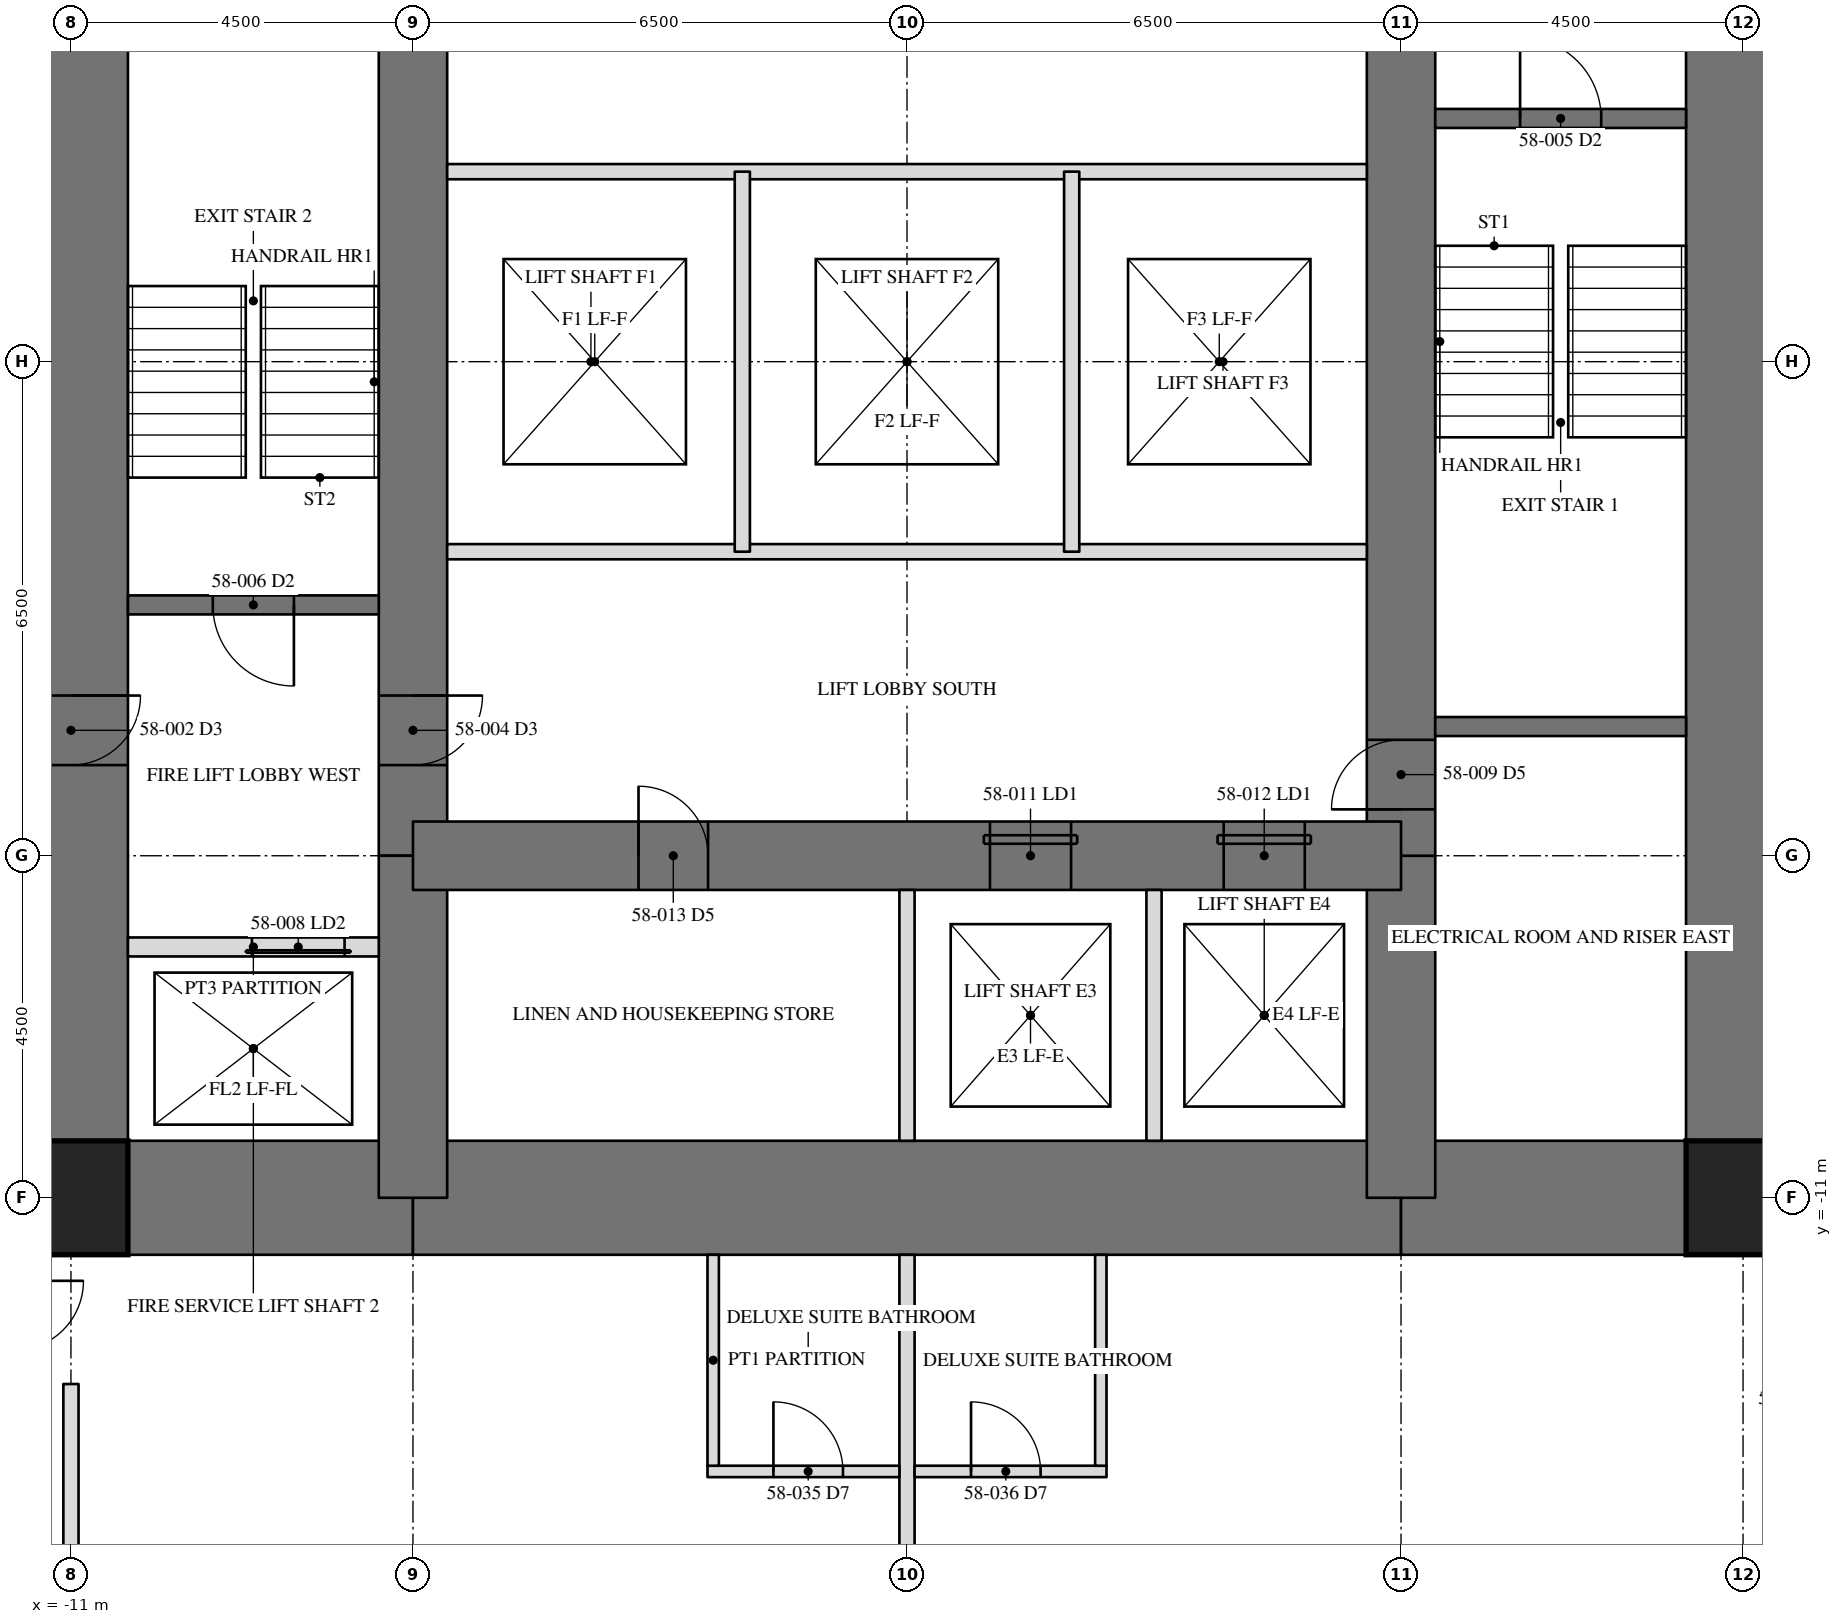
"""IFC4 building model, lengths in metres.
Left out: names, types, materials, properties, quantities, classifications, styles, units other than length and angle.
Written with IfcOpenShell. Run it as: python <this file> out.ifc"""

import sys

from ifc_helpers import new_model, si_unit, direction, frame, frame_2d, origin, origin_2d, place, context, subcontext, project, spatial, rectangle, hollow_rectangle, extrude, element, fill, save


model = new_model("IFC4")
c1 = context("Model", 3, precision=1e-05, world=origin(), true_north=direction((0.0, 1.0)))
c2 = subcontext(c1, "Body", "Model", "MODEL_VIEW")
j1 = project(units=[si_unit("LENGTHUNIT", "METRE"), si_unit("PLANEANGLEUNIT", "RADIAN")], contexts=[c1])
p1 = place(None, origin())
s1 = spatial("IfcSite", under=j1, at=p1, CompositionType="ELEMENT")
p2 = place(p1, origin())
s2 = spatial("IfcBuilding", under=s1, at=p2, CompositionType="ELEMENT")
p3 = place(p2, frame((0.0, 0.0, 239.7)))
s3 = spatial("IfcBuildingStorey", under=s2, at=p3, CompositionType="ELEMENT", Elevation=239.7)
p4 = place(p3, frame((11.0, -11.0, 0.0), z_axis=(0.0, 0.0, 1.0), x_axis=(0.0, 1.0, 0.0)))
e1 = element("IfcWall", 1, at=p4, inside=s3, PredefinedType="SHEAR", context=c2, shape_type="SweptSolid", body=[
    extrude(rectangle(XDim=22.0, YDim=1.5, at=frame_2d((11.0, 0.0))), origin(), (0.0, 0.0, 1.0), 3.5),
])
p5 = place(p4, frame((15.393, 0.0, 0.0)))
e2 = element("IfcOpeningElement", 2, at=p5, cuts=e1, PredefinedType="OPENING", context=c2, shape_type="SweptSolid", body=[
    extrude(rectangle(XDim=0.915, YDim=2.134, at=frame_2d((0.458, 1.067))), frame((0.0, 0.76, 0.0), z_axis=(0.0, -1.0, 0.0), x_axis=(1.0, 0.0, 0.0)), (0.0, 0.0, 1.0), 1.52),
])
p6 = place(p3, frame((-11.0, 11.0, 0.0), z_axis=(0.0, 0.0, 1.0), x_axis=(0.0, -1.0, 0.0)))
e3 = element("IfcWall", 3, at=p6, inside=s3, PredefinedType="SHEAR", context=c2, shape_type="SweptSolid", body=[
    extrude(rectangle(XDim=22.0, YDim=1.5, at=frame_2d((11.0, 0.0))), origin(), (0.0, 0.0, 1.0), 3.5),
])
p7 = place(p6, frame((15.393, 0.0, 0.0)))
e4 = element("IfcOpeningElement", 4, at=p7, cuts=e3, PredefinedType="OPENING", context=c2, shape_type="SweptSolid", body=[
    extrude(rectangle(XDim=0.915, YDim=2.134, at=frame_2d((0.458, 1.067))), frame((0.0, 0.76, 0.0), z_axis=(0.0, -1.0, 0.0), x_axis=(1.0, 0.0, 0.0)), (0.0, 0.0, 1.0), 1.52),
])
p8 = place(p3, frame((-11.0, -11.0, 0.0), z_axis=(0.0, 0.0, 1.0), x_axis=(1.0, 0.0, 0.0)))
e5 = element("IfcWall", 5, at=p8, inside=s3, PredefinedType="SHEAR", context=c2, shape_type="SweptSolid", body=[
    extrude(rectangle(XDim=4.5, YDim=1.5, at=frame_2d((2.25, 0.0))), origin(), (0.0, 0.0, 1.0), 3.5),
])
p9 = place(p3, frame((-6.5, -11.0, 0.0), z_axis=(0.0, 0.0, 1.0), x_axis=(1.0, 0.0, 0.0)))
e6 = element("IfcWall", 6, at=p9, inside=s3, PredefinedType="SHEAR", context=c2, shape_type="SweptSolid", body=[
    extrude(rectangle(XDim=13.0, YDim=1.5, at=frame_2d((6.5, 0.0))), origin(), (0.0, 0.0, 1.0), 3.5),
])
p10 = place(p3, frame((6.5, -11.0, 0.0), z_axis=(0.0, 0.0, 1.0), x_axis=(1.0, 0.0, 0.0)))
e7 = element("IfcWall", 7, at=p10, inside=s3, PredefinedType="SHEAR", context=c2, shape_type="SweptSolid", body=[
    extrude(rectangle(XDim=4.5, YDim=1.5, at=frame_2d((2.25, 0.0))), origin(), (0.0, 0.0, 1.0), 3.5),
])
p11 = place(p3, frame((6.5, -11.0, 0.0), z_axis=(0.0, 0.0, 1.0), x_axis=(0.0, 1.0, 0.0)))
e8 = element("IfcWall", 8, at=p11, inside=s3, PredefinedType="SHEAR", context=c2, shape_type="SweptSolid", body=[
    extrude(rectangle(XDim=4.5, YDim=0.9, at=frame_2d((2.25, 0.0))), origin(), (0.0, 0.0, 1.0), 3.5),
])
p12 = place(p3, frame((6.5, -6.5, 0.0), z_axis=(0.0, 0.0, 1.0), x_axis=(0.0, 1.0, 0.0)))
e9 = element("IfcWall", 9, at=p12, inside=s3, PredefinedType="SHEAR", context=c2, shape_type="SweptSolid", body=[
    extrude(rectangle(XDim=13.0, YDim=0.9, at=frame_2d((6.5, 0.0))), origin(), (0.0, 0.0, 1.0), 3.5),
])
p13 = place(p12, frame((10.893, 0.0, 0.0)))
e10 = element("IfcOpeningElement", 10, at=p13, cuts=e9, PredefinedType="OPENING", context=c2, shape_type="SweptSolid", body=[
    extrude(rectangle(XDim=0.915, YDim=2.134, at=frame_2d((0.458, 1.067))), frame((0.0, 0.46, 0.0), z_axis=(0.0, -1.0, 0.0), x_axis=(1.0, 0.0, 0.0)), (0.0, 0.0, 1.0), 0.92),
])
p14 = place(p12, frame((0.61, 0.0, 0.0)))
e11 = element("IfcOpeningElement", 11, at=p14, cuts=e9, PredefinedType="OPENING", context=c2, shape_type="SweptSolid", body=[
    extrude(rectangle(XDim=0.915, YDim=2.134, at=frame_2d((0.458, 1.067))), frame((0.0, 0.46, 0.0), z_axis=(0.0, -1.0, 0.0), x_axis=(1.0, 0.0, 0.0)), (0.0, 0.0, 1.0), 0.92),
])
p15 = place(p3, frame((-6.5, 6.5, 0.0), z_axis=(0.0, 0.0, 1.0), x_axis=(0.0, -1.0, 0.0)))
e12 = element("IfcWall", 12, at=p15, inside=s3, PredefinedType="SHEAR", context=c2, shape_type="SweptSolid", body=[
    extrude(rectangle(XDim=13.0, YDim=0.9, at=frame_2d((6.5, 0.0))), origin(), (0.0, 0.0, 1.0), 3.5),
])
p16 = place(p15, frame((10.893, 0.0, 0.0)))
e13 = element("IfcOpeningElement", 13, at=p16, cuts=e12, PredefinedType="OPENING", context=c2, shape_type="SweptSolid", body=[
    extrude(rectangle(XDim=0.915, YDim=2.134, at=frame_2d((0.458, 1.067))), frame((0.0, 0.46, 0.0), z_axis=(0.0, -1.0, 0.0), x_axis=(1.0, 0.0, 0.0)), (0.0, 0.0, 1.0), 0.92),
])
p17 = place(p15, frame((0.61, 0.0, 0.0)))
e14 = element("IfcOpeningElement", 14, at=p17, cuts=e12, PredefinedType="OPENING", context=c2, shape_type="SweptSolid", body=[
    extrude(rectangle(XDim=0.915, YDim=2.134, at=frame_2d((0.458, 1.067))), frame((0.0, 0.46, 0.0), z_axis=(0.0, -1.0, 0.0), x_axis=(1.0, 0.0, 0.0)), (0.0, 0.0, 1.0), 0.92),
])
p18 = place(p3, frame((-6.5, -6.5, 0.0), z_axis=(0.0, 0.0, 1.0), x_axis=(0.0, -1.0, 0.0)))
e15 = element("IfcWall", 15, at=p18, inside=s3, PredefinedType="SHEAR", context=c2, shape_type="SweptSolid", body=[
    extrude(rectangle(XDim=4.5, YDim=0.9, at=frame_2d((2.25, 0.0))), origin(), (0.0, 0.0, 1.0), 3.5),
])
p19 = place(p3, frame((-6.5, -6.5, 0.0), z_axis=(0.0, 0.0, 1.0), x_axis=(1.0, 0.0, 0.0)))
e16 = element("IfcWall", 16, at=p19, inside=s3, PredefinedType="SHEAR", context=c2, shape_type="SweptSolid", body=[
    extrude(rectangle(XDim=13.0, YDim=0.9, at=frame_2d((6.5, 0.0))), origin(), (0.0, 0.0, 1.0), 3.5),
])
p20 = place(p19, frame((7.592, 0.0, 0.0)))
e17 = element("IfcOpeningElement", 17, at=p20, cuts=e16, PredefinedType="OPENING", context=c2, shape_type="SweptSolid", body=[
    extrude(rectangle(XDim=1.067, YDim=2.134, at=frame_2d((0.533, 1.067))), frame((0.0, 0.46, 0.0), z_axis=(0.0, -1.0, 0.0), x_axis=(1.0, 0.0, 0.0)), (0.0, 0.0, 1.0), 0.92),
])
p21 = place(p19, frame((10.667, 0.0, 0.0)))
e18 = element("IfcOpeningElement", 18, at=p21, cuts=e16, PredefinedType="OPENING", context=c2, shape_type="SweptSolid", body=[
    extrude(rectangle(XDim=1.067, YDim=2.134, at=frame_2d((0.533, 1.067))), frame((0.0, 0.46, 0.0), z_axis=(0.0, -1.0, 0.0), x_axis=(1.0, 0.0, 0.0)), (0.0, 0.0, 1.0), 0.92),
])
p22 = place(p19, frame((2.968, 0.0, 0.0)))
e19 = element("IfcOpeningElement", 19, at=p22, cuts=e16, PredefinedType="OPENING", context=c2, shape_type="SweptSolid", body=[
    extrude(rectangle(XDim=0.915, YDim=2.134, at=frame_2d((0.458, 1.067))), frame((0.0, 0.46, 0.0), z_axis=(0.0, -1.0, 0.0), x_axis=(1.0, 0.0, 0.0)), (0.0, 0.0, 1.0), 0.92),
])
for number, where, z_axis, x_axis in (
    (20, (-11.0, -11.0, 0.0), (0.0, 0.0, 1.0), (1.0, 0.0, 0.0)),
    (21, (11.0, -11.0, 0.0), (0.0, 0.0, 1.0), (1.0, 0.0, 0.0)),
):
    element("IfcColumn", number, at=place(p3, frame(where, z_axis=z_axis, x_axis=x_axis)), inside=s3, PredefinedType="COLUMN", context=c2, shape_type="SweptSolid", body=[
        extrude(hollow_rectangle(XDim=1.499, YDim=1.499, WallThickness=0.102, at=origin_2d()), origin(), (0.0, 0.0, 1.0), 3.5),
    ])
p23 = place(p3, frame((6.95, -4.8, 0.0), z_axis=(0.0, 0.0, 1.0), x_axis=(1.0, 0.0, 0.0)))
e22 = element("IfcWall", 22, at=p23, inside=s3, PredefinedType="SOLIDWALL", context=c2, shape_type="SweptSolid", body=[
    extrude(rectangle(XDim=3.3, YDim=0.25, at=frame_2d((1.65, 0.0))), origin(), (0.0, 0.0, 1.0), 3.31),
])
p24 = place(p3, frame((6.95, 3.2, 0.0), z_axis=(0.0, 0.0, 1.0), x_axis=(1.0, 0.0, 0.0)))
e23 = element("IfcWall", 23, at=p24, inside=s3, PredefinedType="SOLIDWALL", context=c2, shape_type="SweptSolid", body=[
    extrude(rectangle(XDim=3.3, YDim=0.25, at=frame_2d((1.65, 0.0))), origin(), (0.0, 0.0, 1.0), 3.31),
])
p25 = place(p24, frame((1.116, 0.0, 0.0)))
e24 = element("IfcOpeningElement", 24, at=p25, cuts=e23, PredefinedType="OPENING", context=c2, shape_type="SweptSolid", body=[
    extrude(rectangle(XDim=1.067, YDim=2.134, at=frame_2d((0.533, 1.067))), frame((0.0, 0.135, 0.0), z_axis=(0.0, -1.0, 0.0), x_axis=(1.0, 0.0, 0.0)), (0.0, 0.0, 1.0), 0.27),
])
p26 = place(p3, frame((-6.95, -3.2, 0.0), z_axis=(0.0, 0.0, 1.0), x_axis=(-1.0, 0.0, 0.0)))
e25 = element("IfcWall", 25, at=p26, inside=s3, PredefinedType="SOLIDWALL", context=c2, shape_type="SweptSolid", body=[
    extrude(rectangle(XDim=3.3, YDim=0.25, at=frame_2d((1.65, 0.0))), origin(), (0.0, 0.0, 1.0), 3.31),
])
p27 = place(p26, frame((1.116, 0.0, 0.0)))
e26 = element("IfcOpeningElement", 26, at=p27, cuts=e25, PredefinedType="OPENING", context=c2, shape_type="SweptSolid", body=[
    extrude(rectangle(XDim=1.067, YDim=2.134, at=frame_2d((0.533, 1.067))), frame((0.0, 0.135, 0.0), z_axis=(0.0, -1.0, 0.0), x_axis=(1.0, 0.0, 0.0)), (0.0, 0.0, 1.0), 0.27),
])
p28 = place(p3, frame((-6.95, -7.7, 0.0), z_axis=(0.0, 0.0, 1.0), x_axis=(-1.0, 0.0, 0.0)))
e27 = element("IfcWall", 27, at=p28, inside=s3, PredefinedType="PARTITIONING", context=c2, shape_type="SweptSolid", body=[
    extrude(rectangle(XDim=3.3, YDim=0.25, at=frame_2d((1.65, 0.0))), origin(), (0.0, 0.0, 1.0), 3.31),
])
p29 = place(p28, frame((0.45, 0.0, 0.0)))
e28 = element("IfcOpeningElement", 28, at=p29, cuts=e27, PredefinedType="OPENING", context=c2, shape_type="SweptSolid", body=[
    extrude(rectangle(XDim=1.219, YDim=2.134, at=frame_2d((0.609, 1.067))), frame((0.0, 0.135, 0.0), z_axis=(0.0, -1.0, 0.0), x_axis=(1.0, 0.0, 0.0)), (0.0, 0.0, 1.0), 0.27),
])
for number, where, z_axis, x_axis in (
    (29, (-6.05, 2.5, 0.0), (0.0, 0.0, 1.0), (1.0, 0.0, 0.0)),
    (30, (6.05, -2.5, 0.0), (0.0, 0.0, 1.0), (-1.0, 0.0, 0.0)),
):
    element("IfcWall", number, at=place(p3, frame(where, z_axis=z_axis, x_axis=x_axis)), inside=s3, PredefinedType="PARTITIONING", context=c2, shape_type="SweptSolid", body=[
        extrude(rectangle(XDim=12.1, YDim=0.2, at=frame_2d((6.05, 0.0))), origin(), (0.0, 0.0, 1.0), 3.31),
    ])
for number, where, z_axis, x_axis in (
    (31, (0.0, -10.25, 0.0), (0.0, 0.0, 1.0), (0.0, 1.0, 0.0)),
    (32, (3.25, -10.25, 0.0), (0.0, 0.0, 1.0), (0.0, 1.0, 0.0)),
):
    element("IfcWall", number, at=place(p3, frame(where, z_axis=z_axis, x_axis=x_axis)), inside=s3, PredefinedType="PARTITIONING", context=c2, shape_type="SweptSolid", body=[
        extrude(rectangle(XDim=3.3, YDim=0.2, at=frame_2d((1.65, 0.0))), origin(), (0.0, 0.0, 1.0), 3.31),
    ])
for number, where, z_axis, x_axis in (
    (33, (-2.167, -2.5, 0.0), (0.0, 0.0, 1.0), (0.0, 1.0, 0.0)),
    (34, (2.167, -2.5, 0.0), (0.0, 0.0, 1.0), (0.0, 1.0, 0.0)),
):
    element("IfcWall", number, at=place(p3, frame(where, z_axis=z_axis, x_axis=x_axis)), inside=s3, PredefinedType="PARTITIONING", context=c2, shape_type="SweptSolid", body=[
        extrude(rectangle(XDim=5.0, YDim=0.2, at=frame_2d((2.5, 0.0))), origin(), (0.0, 0.0, 1.0), 3.31),
    ])
p30 = place(p3, frame((-11.0, -13.45, 0.0), z_axis=(0.0, 0.0, 1.0), x_axis=(0.0, -1.0, 0.0)))
e35 = element("IfcWall", 35, at=p30, inside=s3, PredefinedType="PARTITIONING", context=c2, shape_type="SweptSolid", body=[
    extrude(rectangle(XDim=6.465, YDim=0.2, at=frame_2d((3.232, 0.0))), origin(), (0.0, 0.0, 1.0), 2.802),
])
p31 = place(p3, frame((0.0, -11.75, 0.0), z_axis=(0.0, 0.0, 1.0), x_axis=(0.0, -1.0, 0.0)))
e36 = element("IfcWall", 36, at=p31, inside=s3, PredefinedType="PARTITIONING", context=c2, shape_type="SweptSolid", body=[
    extrude(rectangle(XDim=8.165, YDim=0.2, at=frame_2d((4.083, 0.0))), origin(), (0.0, 0.0, 1.0), 2.802),
])
p32 = place(p3, frame((-2.625, -14.6, 0.0), z_axis=(0.0, 0.0, 1.0), x_axis=(1.0, 0.0, 0.0)))
e37 = element("IfcWall", 37, at=p32, inside=s3, PredefinedType="PARTITIONING", context=c2, shape_type="SweptSolid", body=[
    extrude(rectangle(XDim=2.525, YDim=0.15, at=frame_2d((1.262, 0.0))), origin(), (0.0, 0.0, 1.0), 3.31),
])
p33 = place(p32, frame((0.867, 0.0, 0.0)))
e38 = element("IfcOpeningElement", 38, at=p33, cuts=e37, PredefinedType="OPENING", context=c2, shape_type="SweptSolid", body=[
    extrude(rectangle(XDim=0.915, YDim=2.032, at=frame_2d((0.458, 1.016))), frame((0.0, 0.085, 0.0), z_axis=(0.0, -1.0, 0.0), x_axis=(1.0, 0.0, 0.0)), (0.0, 0.0, 1.0), 0.17),
])
p34 = place(p3, frame((-2.55, -11.75, 0.0), z_axis=(0.0, 0.0, 1.0), x_axis=(0.0, -1.0, 0.0)))
e39 = element("IfcWall", 39, at=p34, inside=s3, PredefinedType="PARTITIONING", context=c2, shape_type="SweptSolid", body=[
    extrude(rectangle(XDim=2.775, YDim=0.15, at=frame_2d((1.387, 0.0))), origin(), (0.0, 0.0, 1.0), 3.31),
])
p35 = place(p3, frame((0.1, -14.6, 0.0), z_axis=(0.0, 0.0, 1.0), x_axis=(1.0, 0.0, 0.0)))
e40 = element("IfcWall", 40, at=p35, inside=s3, PredefinedType="PARTITIONING", context=c2, shape_type="SweptSolid", body=[
    extrude(rectangle(XDim=2.525, YDim=0.15, at=frame_2d((1.262, 0.0))), origin(), (0.0, 0.0, 1.0), 3.31),
])
p36 = place(p35, frame((0.742, 0.0, 0.0)))
e41 = element("IfcOpeningElement", 41, at=p36, cuts=e40, PredefinedType="OPENING", context=c2, shape_type="SweptSolid", body=[
    extrude(rectangle(XDim=0.915, YDim=2.032, at=frame_2d((0.458, 1.016))), frame((0.0, 0.085, 0.0), z_axis=(0.0, -1.0, 0.0), x_axis=(1.0, 0.0, 0.0)), (0.0, 0.0, 1.0), 0.17),
])
p37 = place(p3, frame((2.55, -11.75, 0.0), z_axis=(0.0, 0.0, 1.0), x_axis=(0.0, -1.0, 0.0)))
e42 = element("IfcWall", 42, at=p37, inside=s3, PredefinedType="PARTITIONING", context=c2, shape_type="SweptSolid", body=[
    extrude(rectangle(XDim=2.775, YDim=0.15, at=frame_2d((1.387, 0.0))), origin(), (0.0, 0.0, 1.0), 3.31),
])
p38 = place(p16, origin())
e43 = element("IfcDoor", 43, at=p38, inside=s3, OperationType="SINGLE_SWING_RIGHT", PredefinedType="DOOR", context=c2, shape_type="SweptSolid", body=[
    extrude(rectangle(XDim=0.915, YDim=2.134, at=frame_2d((0.458, 1.067))), frame((0.0, -0.375, 0.0), z_axis=(0.0, -1.0, 0.0), x_axis=(1.0, 0.0, 0.0)), (0.0, 0.0, 1.0), 0.05),
])
fill(e13, e43)
p39 = place(p25, origin())
e44 = element("IfcDoor", 44, at=p39, inside=s3, OperationType="SINGLE_SWING_LEFT", PredefinedType="DOOR", context=c2, shape_type="SweptSolid", body=[
    extrude(rectangle(XDim=1.067, YDim=2.134, at=frame_2d((0.533, 1.067))), frame((0.0, 0.025, 0.0), z_axis=(0.0, -1.0, 0.0), x_axis=(1.0, 0.0, 0.0)), (0.0, 0.0, 1.0), 0.05),
])
fill(e24, e44)
p40 = place(p27, origin())
e45 = element("IfcDoor", 45, at=p40, inside=s3, OperationType="SINGLE_SWING_LEFT", PredefinedType="DOOR", context=c2, shape_type="SweptSolid", body=[
    extrude(rectangle(XDim=1.067, YDim=2.134, at=frame_2d((0.533, 1.067))), frame((0.0, 0.025, 0.0), z_axis=(0.0, -1.0, 0.0), x_axis=(1.0, 0.0, 0.0)), (0.0, 0.0, 1.0), 0.05),
])
fill(e26, e45)
p41 = place(p29, origin())
e46 = element("IfcDoor", 46, at=p41, inside=s3, OperationType="SLIDING_TO_LEFT", PredefinedType="DOOR", context=c2, shape_type="SweptSolid", body=[
    extrude(rectangle(XDim=1.219, YDim=2.134, at=frame_2d((0.609, 1.067))), frame((0.0, 0.025, 0.0), z_axis=(0.0, -1.0, 0.0), x_axis=(1.0, 0.0, 0.0)), (0.0, 0.0, 1.0), 0.05),
])
fill(e28, e46)
p42 = place(p14, origin())
e47 = element("IfcDoor", 47, at=p42, inside=s3, OperationType="SINGLE_SWING_RIGHT", PredefinedType="DOOR", context=c2, shape_type="SweptSolid", body=[
    extrude(rectangle(XDim=0.915, YDim=2.134, at=frame_2d((0.458, 1.067))), frame((0.0, -0.375, 0.0), z_axis=(0.0, -1.0, 0.0), x_axis=(1.0, 0.0, 0.0)), (0.0, 0.0, 1.0), 0.05),
])
fill(e11, e47)
p43 = place(p20, origin())
e48 = element("IfcDoor", 48, at=p43, inside=s3, OperationType="SLIDING_TO_LEFT", PredefinedType="DOOR", context=c2, shape_type="SweptSolid", body=[
    extrude(rectangle(XDim=1.067, YDim=2.134, at=frame_2d((0.533, 1.067))), frame((0.0, -0.375, 0.0), z_axis=(0.0, -1.0, 0.0), x_axis=(1.0, 0.0, 0.0)), (0.0, 0.0, 1.0), 0.05),
])
fill(e17, e48)
p44 = place(p21, origin())
e49 = element("IfcDoor", 49, at=p44, inside=s3, OperationType="SLIDING_TO_LEFT", PredefinedType="DOOR", context=c2, shape_type="SweptSolid", body=[
    extrude(rectangle(XDim=1.067, YDim=2.134, at=frame_2d((0.533, 1.067))), frame((0.0, -0.375, 0.0), z_axis=(0.0, -1.0, 0.0), x_axis=(1.0, 0.0, 0.0)), (0.0, 0.0, 1.0), 0.05),
])
fill(e18, e49)
p45 = place(p22, origin())
e50 = element("IfcDoor", 50, at=p45, inside=s3, OperationType="SINGLE_SWING_RIGHT", PredefinedType="DOOR", context=c2, shape_type="SweptSolid", body=[
    extrude(rectangle(XDim=0.915, YDim=2.134, at=frame_2d((0.458, 1.067))), frame((0.0, -0.375, 0.0), z_axis=(0.0, -1.0, 0.0), x_axis=(1.0, 0.0, 0.0)), (0.0, 0.0, 1.0), 0.05),
])
fill(e19, e50)
p46 = place(p33, origin())
e51 = element("IfcDoor", 51, at=p46, inside=s3, OperationType="SINGLE_SWING_LEFT", PredefinedType="DOOR", context=c2, shape_type="SweptSolid", body=[
    extrude(rectangle(XDim=0.915, YDim=2.032, at=frame_2d((0.458, 1.016))), frame((0.0, 0.025, 0.0), z_axis=(0.0, -1.0, 0.0), x_axis=(1.0, 0.0, 0.0)), (0.0, 0.0, 1.0), 0.05),
])
fill(e38, e51)
p47 = place(p36, origin())
e52 = element("IfcDoor", 52, at=p47, inside=s3, OperationType="SINGLE_SWING_LEFT", PredefinedType="DOOR", context=c2, shape_type="SweptSolid", body=[
    extrude(rectangle(XDim=0.915, YDim=2.032, at=frame_2d((0.458, 1.016))), frame((0.0, 0.025, 0.0), z_axis=(0.0, -1.0, 0.0), x_axis=(1.0, 0.0, 0.0)), (0.0, 0.0, 1.0), 0.05),
])
fill(e41, e52)
save(model, sys.argv[1])
